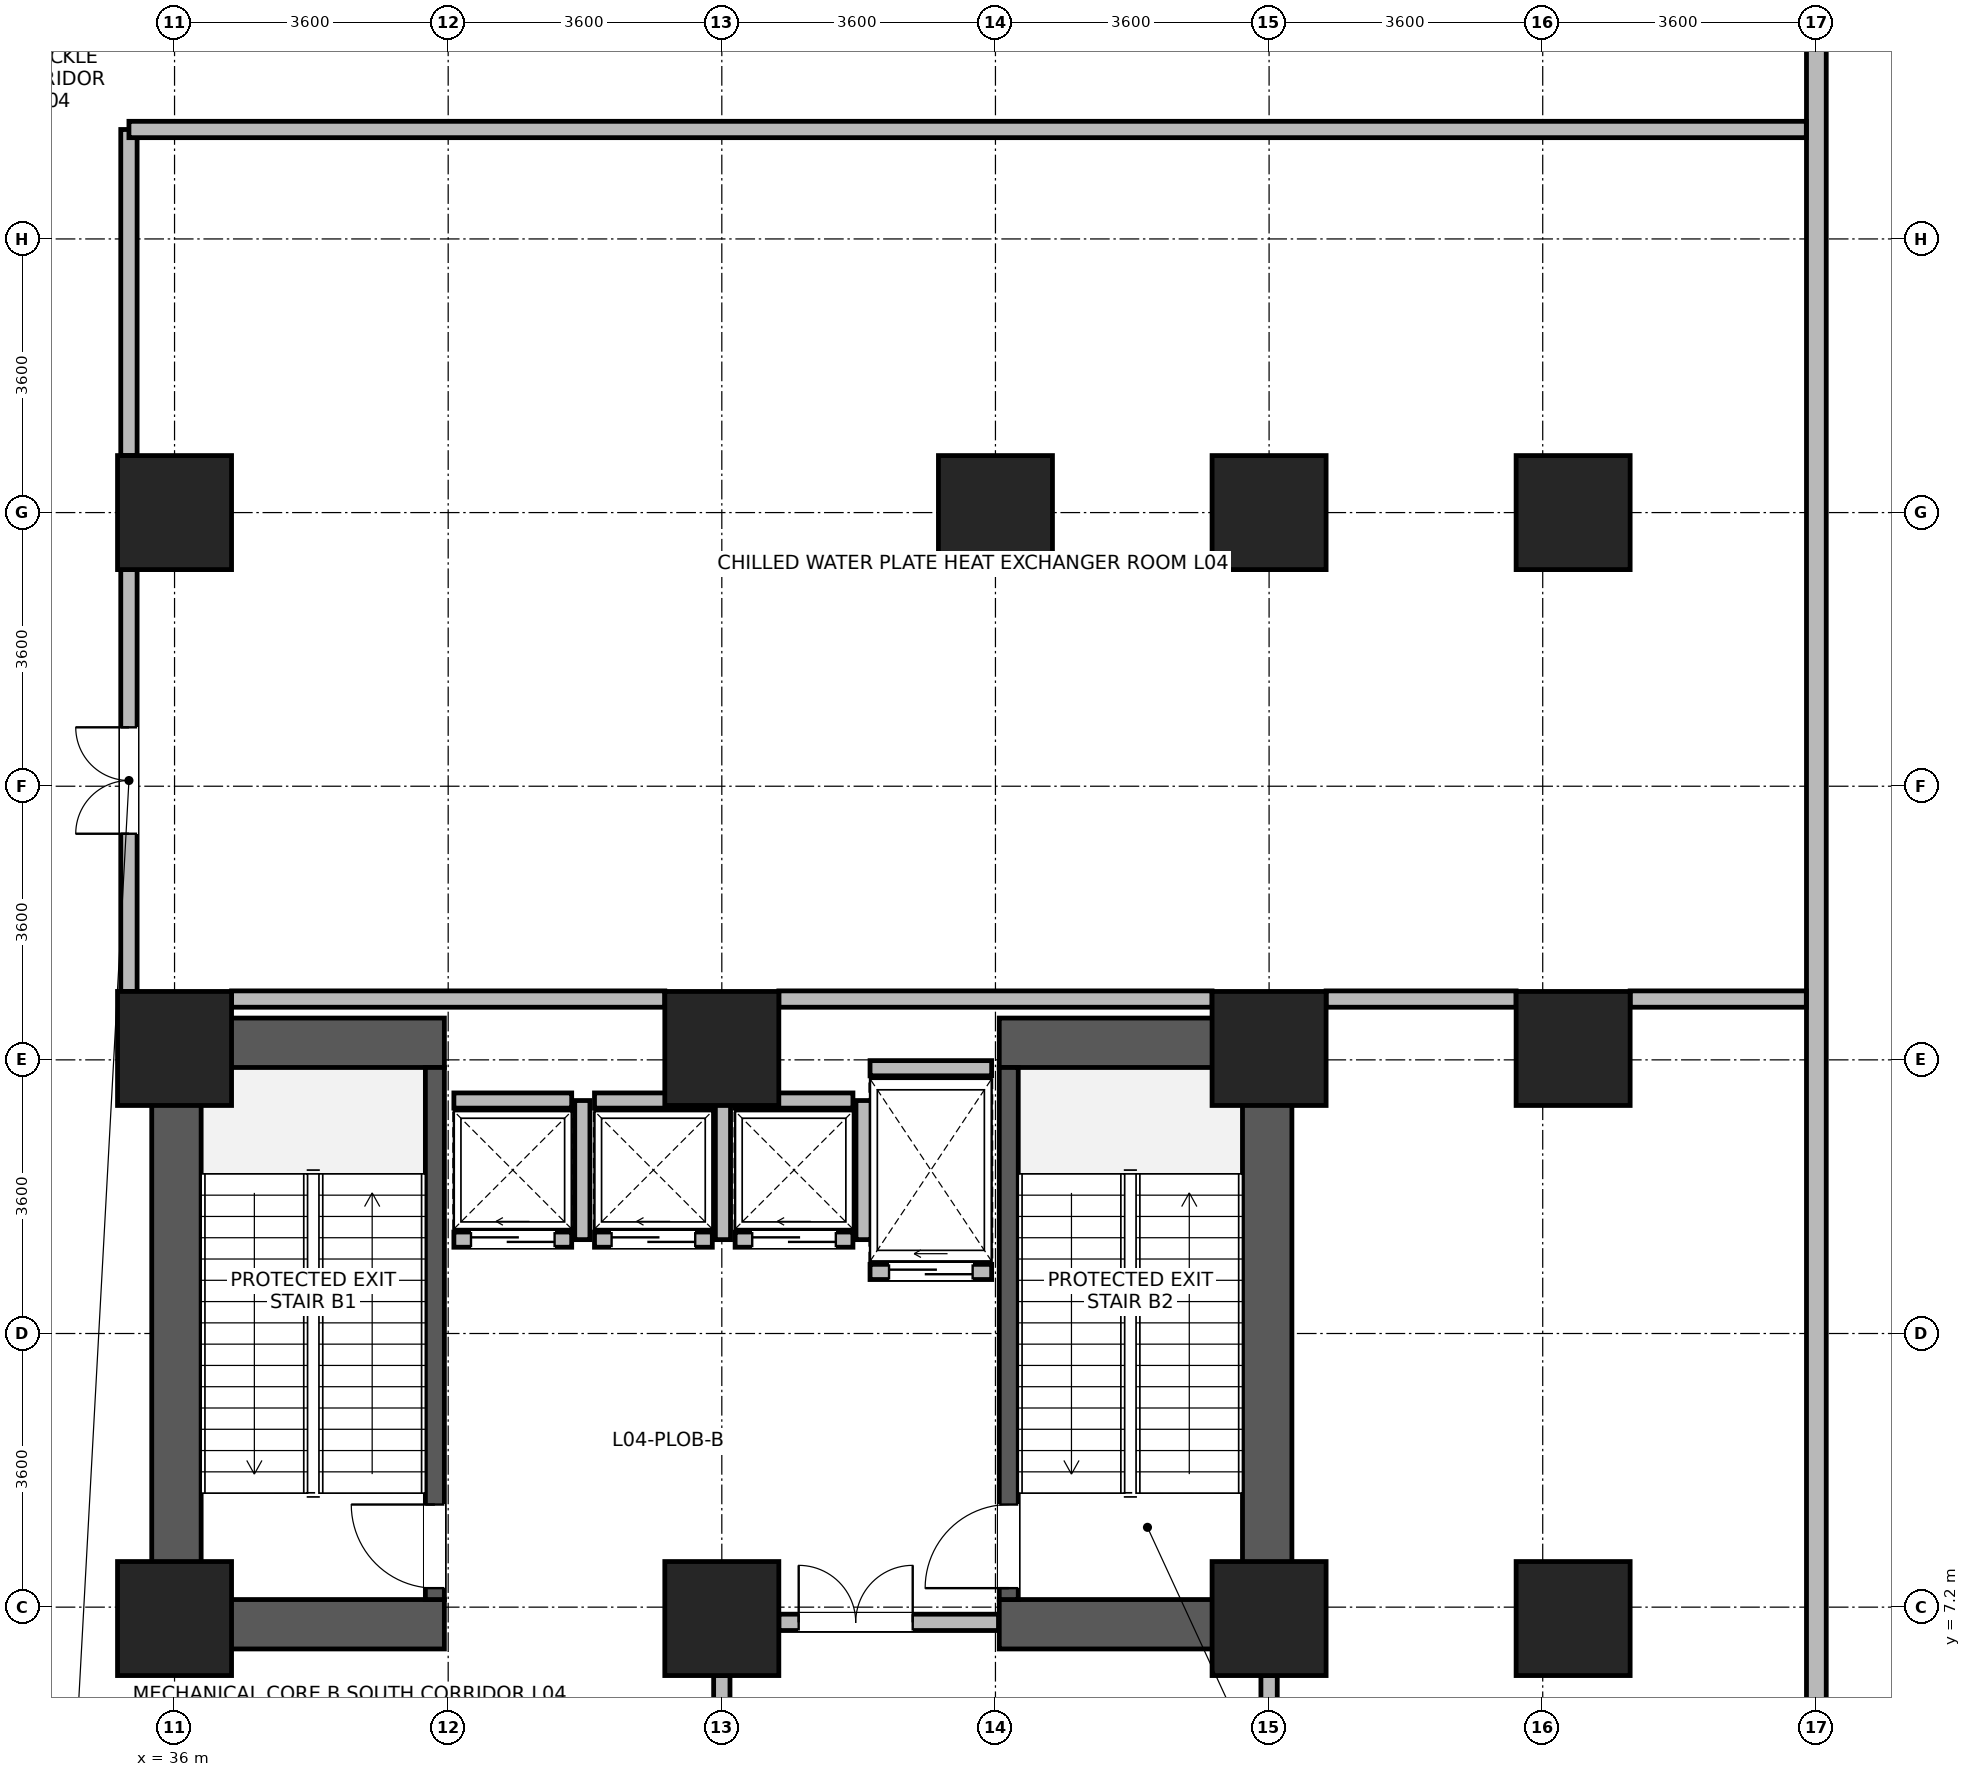
"""IFC4 building model, lengths in metres.
Left out: names, types, materials, properties, quantities, classifications, styles, units other than length and angle.
Written with IfcOpenShell. Run it as: python <this file> out.ifc"""

import sys

from ifc_helpers import new_model, si_unit, direction, frame, frame_2d, origin, origin_2d, place, context, subcontext, project, spatial, rectangle, extrude, source, transform, mapped, element, fill, save


model = new_model("IFC4")
c1 = context("Model", 3, precision=1e-05, world=origin(), true_north=direction((0.0, 1.0)))
c2 = subcontext(c1, "Body", "Model", "MODEL_VIEW")
j1 = project(units=[si_unit("LENGTHUNIT", "METRE"), si_unit("PLANEANGLEUNIT", "RADIAN")], contexts=[c1])
p1 = place(None, origin())
s1 = spatial("IfcSite", under=j1, at=p1, CompositionType="ELEMENT")
p2 = place(p1, origin())
s2 = spatial("IfcBuilding", under=s1, at=p2, CompositionType="ELEMENT")
p3 = place(p2, frame((0.0, 0.0, 19.8)))
s3 = spatial("IfcBuildingStorey", under=s2, at=p3, CompositionType="ELEMENT", Elevation=19.8)
for number, where, z_axis, x_axis in (
    (1, (36.025, 6.65, 0.0), (0.0, 0.0, 1.0), (0.0, 1.0, 0.0)),
    (2, (50.375, 6.65, 0.0), (0.0, 0.0, 1.0), (0.0, 1.0, 0.0)),
):
    element("IfcWall", number, at=place(p3, frame(where, z_axis=z_axis, x_axis=x_axis)), inside=s3, PredefinedType="SHEAR", context=c2, shape_type="SweptSolid", body=[
        extrude(rectangle(XDim=8.3, YDim=0.65, at=frame_2d((4.15, 0.0))), origin(), (0.0, 0.0, 1.0), 5.08),
    ])
for number, where, z_axis, x_axis in (
    (3, (36.35, 6.975, 0.0), (0.0, 0.0, 1.0), (1.0, 0.0, 0.0)),
    (4, (46.85, 6.975, 0.0), (0.0, 0.0, 1.0), (1.0, 0.0, 0.0)),
    (5, (36.35, 14.625, 0.0), (0.0, 0.0, 1.0), (1.0, 0.0, 0.0)),
    (6, (46.85, 14.625, 0.0), (0.0, 0.0, 1.0), (1.0, 0.0, 0.0)),
):
    element("IfcWall", number, at=place(p3, frame(where, z_axis=z_axis, x_axis=x_axis)), inside=s3, PredefinedType="SHEAR", context=c2, shape_type="SweptSolid", body=[
        extrude(rectangle(XDim=3.2, YDim=0.65, at=frame_2d((1.6, 0.0))), origin(), (0.0, 0.0, 1.0), 5.08),
    ])
p4 = place(p3, frame((39.425, 7.3, 0.0), z_axis=(0.0, 0.0, 1.0), x_axis=(0.0, 1.0, 0.0)))
e7 = element("IfcWall", 7, at=p4, inside=s3, PredefinedType="SHEAR", context=c2, shape_type="SweptSolid", body=[
    extrude(rectangle(XDim=7.0, YDim=0.25, at=frame_2d((3.5, 0.0))), origin(), (0.0, 0.0, 1.0), 5.08),
])
p5 = place(p4, frame((0.15, 0.0, 0.0)))
e8 = element("IfcOpeningElement", 8, at=p5, cuts=e7, PredefinedType="OPENING", context=c2, shape_type="SweptSolid", body=[
    extrude(rectangle(XDim=1.1, YDim=2.08, at=frame_2d((0.55, 1.04))), frame((0.0, 0.135, 0.0), z_axis=(0.0, -1.0, 0.0), x_axis=(1.0, 0.0, 0.0)), (0.0, 0.0, 1.0), 0.27),
])
p6 = place(p3, frame((46.975, 7.3, 0.0), z_axis=(0.0, 0.0, 1.0), x_axis=(0.0, 1.0, 0.0)))
e9 = element("IfcWall", 9, at=p6, inside=s3, PredefinedType="SHEAR", context=c2, shape_type="SweptSolid", body=[
    extrude(rectangle(XDim=7.0, YDim=0.25, at=frame_2d((3.5, 0.0))), origin(), (0.0, 0.0, 1.0), 5.08),
])
p7 = place(p6, frame((0.15, 0.0, 0.0)))
e10 = element("IfcOpeningElement", 10, at=p7, cuts=e9, PredefinedType="OPENING", context=c2, shape_type="SweptSolid", body=[
    extrude(rectangle(XDim=1.1, YDim=2.08, at=frame_2d((0.55, 1.04))), frame((0.0, 0.135, 0.0), z_axis=(0.0, -1.0, 0.0), x_axis=(1.0, 0.0, 0.0)), (0.0, 0.0, 1.0), 0.27),
])
m1 = source(origin(), c2, "Body", "SweptSolid", [
    extrude(rectangle(XDim=1.5, YDim=1.5, at=origin_2d()), origin(), (0.0, 0.0, 1.0), 5.5),
])
for number, where, z_axis, x_axis in (
    (11, (36.0, 21.6, 0.0), (0.0, 0.0, 1.0), (1.0, 0.0, 0.0)),
    (12, (46.8, 21.6, 0.0), (0.0, 0.0, 1.0), (1.0, 0.0, 0.0)),
    (13, (36.0, 7.05, 0.0), (0.0, 0.0, 1.0), (1.0, 0.0, 0.0)),
    (14, (36.0, 14.55, 0.0), (0.0, 0.0, 1.0), (1.0, 0.0, 0.0)),
    (15, (43.2, 7.05, 0.0), (0.0, 0.0, 1.0), (1.0, 0.0, 0.0)),
    (16, (43.2, 14.55, 0.0), (0.0, 0.0, 1.0), (1.0, 0.0, 0.0)),
    (17, (50.4, 7.05, 0.0), (0.0, 0.0, 1.0), (1.0, 0.0, 0.0)),
    (18, (50.4, 14.55, 0.0), (0.0, 0.0, 1.0), (1.0, 0.0, 0.0)),
    (19, (50.4, 21.6, 0.0), (0.0, 0.0, 1.0), (1.0, 0.0, 0.0)),
    (20, (54.4, 7.05, 0.0), (0.0, 0.0, 1.0), (1.0, 0.0, 0.0)),
    (21, (54.4, 14.55, 0.0), (0.0, 0.0, 1.0), (1.0, 0.0, 0.0)),
    (22, (54.4, 21.6, 0.0), (0.0, 0.0, 1.0), (1.0, 0.0, 0.0)),
):
    element("IfcColumn", number, at=place(p3, frame(where, z_axis=z_axis, x_axis=x_axis)), inside=s3, PredefinedType="COLUMN", context=c2, shape_type="MappedRepresentation", body=[
        mapped(m1, transform((0.0, 0.0, 0.0), x_axis=(1.0, 0.0, 0.0), y_axis=(0.0, 1.0, 0.0), z_axis=(0.0, 0.0, 1.0), scale=1.0)),
    ])
p8 = place(p3, frame((57.6, 43.33, 0.0), z_axis=(0.0, 0.0, 1.0), x_axis=(0.0, -1.0, 0.0)))
e23 = element("IfcWall", 23, at=p8, inside=s3, PredefinedType="STANDARD", context=c2, shape_type="SweptSolid", body=[
    extrude(rectangle(XDim=41.66, YDim=0.26, at=frame_2d((20.83, 0.0))), origin(), (0.0, 0.0, 1.0), 5.06),
])
p9 = place(p3, frame((39.675, 12.035, 0.0), z_axis=(0.0, 0.0, 1.0), x_axis=(1.0, 0.0, 0.0)))
e24 = element("IfcWall", 24, at=p9, inside=s3, PredefinedType="PARTITIONING", context=c2, shape_type="SweptSolid", body=[
    extrude(rectangle(XDim=1.55, YDim=0.2, at=frame_2d((0.775, 0.0))), origin(), (0.0, 0.0, 1.0), 5.06),
])
p10 = place(p9, frame((0.225, 0.0, 0.0)))
e25 = element("IfcOpeningElement", 25, at=p10, cuts=e24, PredefinedType="OPENING", context=c2, shape_type="SweptSolid", body=[
    extrude(rectangle(XDim=1.1, YDim=2.12, at=frame_2d((0.55, 1.06))), frame((0.0, 0.11, 0.0), z_axis=(0.0, -1.0, 0.0), x_axis=(1.0, 0.0, 0.0)), (0.0, 0.0, 1.0), 0.22),
])
p11 = place(p3, frame((39.675, 13.865, 0.0), z_axis=(0.0, 0.0, 1.0), x_axis=(1.0, 0.0, 0.0)))
e26 = element("IfcWall", 26, at=p11, inside=s3, PredefinedType="PARTITIONING", context=c2, shape_type="SweptSolid", body=[
    extrude(rectangle(XDim=1.55, YDim=0.2, at=frame_2d((0.775, 0.0))), origin(), (0.0, 0.0, 1.0), 5.06),
])
p12 = place(p3, frame((41.365, 12.035, 0.0), z_axis=(0.0, 0.0, 1.0), x_axis=(0.0, 1.0, 0.0)))
e27 = element("IfcWall", 27, at=p12, inside=s3, PredefinedType="PARTITIONING", context=c2, shape_type="SweptSolid", body=[
    extrude(rectangle(XDim=1.83, YDim=0.2, at=frame_2d((0.915, 0.0))), origin(), (0.0, 0.0, 1.0), 5.06),
])
p13 = place(p3, frame((41.525, 12.035, 0.0), z_axis=(0.0, 0.0, 1.0), x_axis=(1.0, 0.0, 0.0)))
e28 = element("IfcWall", 28, at=p13, inside=s3, PredefinedType="PARTITIONING", context=c2, shape_type="SweptSolid", body=[
    extrude(rectangle(XDim=1.55, YDim=0.2, at=frame_2d((0.775, 0.0))), origin(), (0.0, 0.0, 1.0), 5.06),
])
p14 = place(p13, frame((0.225, 0.0, 0.0)))
e29 = element("IfcOpeningElement", 29, at=p14, cuts=e28, PredefinedType="OPENING", context=c2, shape_type="SweptSolid", body=[
    extrude(rectangle(XDim=1.1, YDim=2.12, at=frame_2d((0.55, 1.06))), frame((0.0, 0.11, 0.0), z_axis=(0.0, -1.0, 0.0), x_axis=(1.0, 0.0, 0.0)), (0.0, 0.0, 1.0), 0.22),
])
p15 = place(p3, frame((41.525, 13.865, 0.0), z_axis=(0.0, 0.0, 1.0), x_axis=(1.0, 0.0, 0.0)))
e30 = element("IfcWall", 30, at=p15, inside=s3, PredefinedType="PARTITIONING", context=c2, shape_type="SweptSolid", body=[
    extrude(rectangle(XDim=1.55, YDim=0.2, at=frame_2d((0.775, 0.0))), origin(), (0.0, 0.0, 1.0), 5.06),
])
p16 = place(p3, frame((43.215, 12.035, 0.0), z_axis=(0.0, 0.0, 1.0), x_axis=(0.0, 1.0, 0.0)))
e31 = element("IfcWall", 31, at=p16, inside=s3, PredefinedType="PARTITIONING", context=c2, shape_type="SweptSolid", body=[
    extrude(rectangle(XDim=1.83, YDim=0.2, at=frame_2d((0.915, 0.0))), origin(), (0.0, 0.0, 1.0), 5.06),
])
p17 = place(p3, frame((43.375, 12.035, 0.0), z_axis=(0.0, 0.0, 1.0), x_axis=(1.0, 0.0, 0.0)))
e32 = element("IfcWall", 32, at=p17, inside=s3, PredefinedType="PARTITIONING", context=c2, shape_type="SweptSolid", body=[
    extrude(rectangle(XDim=1.55, YDim=0.2, at=frame_2d((0.775, 0.0))), origin(), (0.0, 0.0, 1.0), 5.06),
])
p18 = place(p17, frame((0.225, 0.0, 0.0)))
e33 = element("IfcOpeningElement", 33, at=p18, cuts=e32, PredefinedType="OPENING", context=c2, shape_type="SweptSolid", body=[
    extrude(rectangle(XDim=1.1, YDim=2.12, at=frame_2d((0.55, 1.06))), frame((0.0, 0.11, 0.0), z_axis=(0.0, -1.0, 0.0), x_axis=(1.0, 0.0, 0.0)), (0.0, 0.0, 1.0), 0.22),
])
p19 = place(p3, frame((43.375, 13.865, 0.0), z_axis=(0.0, 0.0, 1.0), x_axis=(1.0, 0.0, 0.0)))
e34 = element("IfcWall", 34, at=p19, inside=s3, PredefinedType="PARTITIONING", context=c2, shape_type="SweptSolid", body=[
    extrude(rectangle(XDim=1.55, YDim=0.2, at=frame_2d((0.775, 0.0))), origin(), (0.0, 0.0, 1.0), 5.06),
])
p20 = place(p3, frame((45.065, 12.035, 0.0), z_axis=(0.0, 0.0, 1.0), x_axis=(0.0, 1.0, 0.0)))
e35 = element("IfcWall", 35, at=p20, inside=s3, PredefinedType="PARTITIONING", context=c2, shape_type="SweptSolid", body=[
    extrude(rectangle(XDim=1.83, YDim=0.2, at=frame_2d((0.915, 0.0))), origin(), (0.0, 0.0, 1.0), 5.06),
])
p21 = place(p3, frame((45.15, 11.61, 0.0), z_axis=(0.0, 0.0, 1.0), x_axis=(1.0, 0.0, 0.0)))
e36 = element("IfcWall", 36, at=p21, inside=s3, PredefinedType="PARTITIONING", context=c2, shape_type="SweptSolid", body=[
    extrude(rectangle(XDim=1.6, YDim=0.2, at=frame_2d((0.8, 0.0))), origin(), (0.0, 0.0, 1.0), 5.06),
])
p22 = place(p21, frame((0.25, 0.0, 0.0)))
e37 = element("IfcOpeningElement", 37, at=p22, cuts=e36, PredefinedType="OPENING", context=c2, shape_type="SweptSolid", body=[
    extrude(rectangle(XDim=1.1, YDim=2.12, at=frame_2d((0.55, 1.06))), frame((0.0, 0.11, 0.0), z_axis=(0.0, -1.0, 0.0), x_axis=(1.0, 0.0, 0.0)), (0.0, 0.0, 1.0), 0.22),
])
p23 = place(p3, frame((45.15, 14.29, 0.0), z_axis=(0.0, 0.0, 1.0), x_axis=(1.0, 0.0, 0.0)))
e38 = element("IfcWall", 38, at=p23, inside=s3, PredefinedType="PARTITIONING", context=c2, shape_type="SweptSolid", body=[
    extrude(rectangle(XDim=1.6, YDim=0.2, at=frame_2d((0.8, 0.0))), origin(), (0.0, 0.0, 1.0), 3.86),
])
p24 = place(p3, frame((43.95, 7.0, 0.0), z_axis=(0.0, 0.0, 1.0), x_axis=(1.0, 0.0, 0.0)))
e39 = element("IfcWall", 39, at=p24, inside=s3, PredefinedType="PARTITIONING", context=c2, shape_type="SweptSolid", body=[
    extrude(rectangle(XDim=2.89, YDim=0.215, at=frame_2d((1.445, 0.0))), origin(), (0.0, 0.0, 1.0), 3.86),
])
p25 = place(p24, frame((0.261, 0.0, 0.0)))
e40 = element("IfcOpeningElement", 40, at=p25, cuts=e39, PredefinedType="OPENING", context=c2, shape_type="SweptSolid", body=[
    extrude(rectangle(XDim=1.5, YDim=2.1, at=frame_2d((0.75, 1.05))), frame((0.0, 0.118, 0.0), z_axis=(0.0, -1.0, 0.0), x_axis=(1.0, 0.0, 0.0)), (0.0, 0.0, 1.0), 0.235),
])
p26 = place(p3, frame((35.4, 15.3, 0.0), z_axis=(0.0, 0.0, 1.0), x_axis=(0.0, 1.0, 0.0)))
e41 = element("IfcWall", 41, at=p26, inside=s3, PredefinedType="PARTITIONING", context=c2, shape_type="SweptSolid", body=[
    extrude(rectangle(XDim=5.55, YDim=0.215, at=frame_2d((2.775, 0.0))), origin(), (0.0, 0.0, 1.0), 5.06),
])
p27 = place(p26, frame((2.075, 0.0, 0.0)))
e42 = element("IfcOpeningElement", 42, at=p27, cuts=e41, PredefinedType="OPENING", context=c2, shape_type="SweptSolid", body=[
    extrude(rectangle(XDim=1.4, YDim=2.15, at=frame_2d((0.7, 1.075))), frame((0.0, 0.118, 0.0), z_axis=(0.0, -1.0, 0.0), x_axis=(1.0, 0.0, 0.0)), (0.0, 0.0, 1.0), 0.235),
])
p28 = place(p3, frame((35.4, 22.35, 0.0), z_axis=(0.0, 0.0, 1.0), x_axis=(0.0, 1.0, 0.0)))
e43 = element("IfcWall", 43, at=p28, inside=s3, PredefinedType="PARTITIONING", context=c2, shape_type="SweptSolid", body=[
    extrude(rectangle(XDim=4.29, YDim=0.215, at=frame_2d((2.145, 0.0))), origin(), (0.0, 0.0, 1.0), 5.06),
])
p29 = place(p3, frame((43.2, 5.1, 0.0), z_axis=(0.0, 0.0, 1.0), x_axis=(0.0, 1.0, 0.0)))
e44 = element("IfcWall", 44, at=p29, inside=s3, PredefinedType="PARTITIONING", context=c2, shape_type="SweptSolid", body=[
    extrude(rectangle(XDim=1.2, YDim=0.215, at=frame_2d((0.6, 0.0))), origin(), (0.0, 0.0, 1.0), 5.06),
])
for number, where, z_axis, x_axis in (
    (45, (36.75, 15.2, 0.0), (0.0, 0.0, 1.0), (1.0, 0.0, 0.0)),
    (46, (43.95, 15.2, 0.0), (0.0, 0.0, 1.0), (1.0, 0.0, 0.0)),
):
    element("IfcWall", number, at=place(p3, frame(where, z_axis=z_axis, x_axis=x_axis)), inside=s3, PredefinedType="PARTITIONING", context=c2, shape_type="SweptSolid", body=[
        extrude(rectangle(XDim=5.7, YDim=0.215, at=frame_2d((2.85, 0.0))), origin(), (0.0, 0.0, 1.0), 5.06),
    ])
p30 = place(p3, frame((51.15, 15.2, 0.0), z_axis=(0.0, 0.0, 1.0), x_axis=(1.0, 0.0, 0.0)))
e47 = element("IfcWall", 47, at=p30, inside=s3, PredefinedType="PARTITIONING", context=c2, shape_type="SweptSolid", body=[
    extrude(rectangle(XDim=2.5, YDim=0.215, at=frame_2d((1.25, 0.0))), origin(), (0.0, 0.0, 1.0), 5.06),
])
p31 = place(p3, frame((55.15, 15.2, 0.0), z_axis=(0.0, 0.0, 1.0), x_axis=(1.0, 0.0, 0.0)))
e48 = element("IfcWall", 48, at=p31, inside=s3, PredefinedType="PARTITIONING", context=c2, shape_type="SweptSolid", body=[
    extrude(rectangle(XDim=2.318, YDim=0.215, at=frame_2d((1.159, 0.0))), origin(), (0.0, 0.0, 1.0), 5.06),
])
p32 = place(p3, frame((35.4, 26.64, 0.0), z_axis=(0.0, 0.0, 1.0), x_axis=(1.0, 0.0, 0.0)))
e49 = element("IfcWall", 49, at=p32, inside=s3, PredefinedType="PARTITIONING", context=c2, shape_type="SweptSolid", body=[
    extrude(rectangle(XDim=22.068, YDim=0.215, at=frame_2d((11.034, 0.0))), origin(), (0.0, 0.0, 1.0), 5.06),
])
p33 = place(p3, frame((50.4, 1.932, 0.0), z_axis=(0.0, 0.0, 1.0), x_axis=(0.0, 1.0, 0.0)))
e50 = element("IfcWall", 50, at=p33, inside=s3, PredefinedType="PARTITIONING", context=c2, shape_type="SweptSolid", body=[
    extrude(rectangle(XDim=4.368, YDim=0.215, at=frame_2d((2.184, 0.0))), origin(), (0.0, 0.0, 1.0), 5.06),
])
p34 = place(p5, origin())
e51 = element("IfcDoor", 51, at=p34, inside=s3, OperationType="SINGLE_SWING_RIGHT", PredefinedType="DOOR", context=c2, shape_type="SweptSolid", body=[
    extrude(rectangle(XDim=1.1, YDim=2.08, at=frame_2d((0.55, 1.04))), frame((0.0, 0.025, 0.0), z_axis=(0.0, -1.0, 0.0), x_axis=(1.0, 0.0, 0.0)), (0.0, 0.0, 1.0), 0.05),
])
fill(e8, e51)
p35 = place(p7, origin())
e52 = element("IfcDoor", 52, at=p35, inside=s3, OperationType="SINGLE_SWING_LEFT", PredefinedType="DOOR", context=c2, shape_type="SweptSolid", body=[
    extrude(rectangle(XDim=1.1, YDim=2.08, at=frame_2d((0.55, 1.04))), frame((0.0, 0.025, 0.0), z_axis=(0.0, -1.0, 0.0), x_axis=(1.0, 0.0, 0.0)), (0.0, 0.0, 1.0), 0.05),
])
fill(e10, e52)
p36 = place(p10, origin())
e53 = element("IfcDoor", 53, at=p36, inside=s3, OperationType="SLIDING_TO_LEFT", PredefinedType="DOOR", context=c2, shape_type="SweptSolid", body=[
    extrude(rectangle(XDim=1.1, YDim=2.12, at=frame_2d((0.55, 1.06))), frame((0.0, 0.025, 0.0), z_axis=(0.0, -1.0, 0.0), x_axis=(1.0, 0.0, 0.0)), (0.0, 0.0, 1.0), 0.05),
])
fill(e25, e53)
p37 = place(p14, origin())
e54 = element("IfcDoor", 54, at=p37, inside=s3, OperationType="SLIDING_TO_LEFT", PredefinedType="DOOR", context=c2, shape_type="SweptSolid", body=[
    extrude(rectangle(XDim=1.1, YDim=2.12, at=frame_2d((0.55, 1.06))), frame((0.0, 0.025, 0.0), z_axis=(0.0, -1.0, 0.0), x_axis=(1.0, 0.0, 0.0)), (0.0, 0.0, 1.0), 0.05),
])
fill(e29, e54)
p38 = place(p18, origin())
e55 = element("IfcDoor", 55, at=p38, inside=s3, OperationType="SLIDING_TO_LEFT", PredefinedType="DOOR", context=c2, shape_type="SweptSolid", body=[
    extrude(rectangle(XDim=1.1, YDim=2.12, at=frame_2d((0.55, 1.06))), frame((0.0, 0.025, 0.0), z_axis=(0.0, -1.0, 0.0), x_axis=(1.0, 0.0, 0.0)), (0.0, 0.0, 1.0), 0.05),
])
fill(e33, e55)
p39 = place(p22, origin())
e56 = element("IfcDoor", 56, at=p39, inside=s3, OperationType="SLIDING_TO_LEFT", PredefinedType="DOOR", context=c2, shape_type="SweptSolid", body=[
    extrude(rectangle(XDim=1.1, YDim=2.12, at=frame_2d((0.55, 1.06))), frame((0.0, 0.025, 0.0), z_axis=(0.0, -1.0, 0.0), x_axis=(1.0, 0.0, 0.0)), (0.0, 0.0, 1.0), 0.05),
])
fill(e37, e56)
p40 = place(p25, origin())
e57 = element("IfcDoor", 57, at=p40, inside=s3, OperationType="DOUBLE_DOOR_SINGLE_SWING", PredefinedType="DOOR", context=c2, shape_type="SweptSolid", body=[
    extrude(rectangle(XDim=1.5, YDim=2.1, at=frame_2d((0.75, 1.05))), frame((0.0, 0.025, 0.0), z_axis=(0.0, -1.0, 0.0), x_axis=(1.0, 0.0, 0.0)), (0.0, 0.0, 1.0), 0.05),
])
fill(e40, e57)
p41 = place(p27, origin())
e58 = element("IfcDoor", 58, at=p41, inside=s3, OperationType="DOUBLE_DOOR_SINGLE_SWING", PredefinedType="DOOR", context=c2, shape_type="SweptSolid", body=[
    extrude(rectangle(XDim=1.4, YDim=2.15, at=frame_2d((0.7, 1.075))), frame((0.0, 0.025, 0.0), z_axis=(0.0, -1.0, 0.0), x_axis=(1.0, 0.0, 0.0)), (0.0, 0.0, 1.0), 0.05),
])
fill(e42, e58)
save(model, sys.argv[1])
